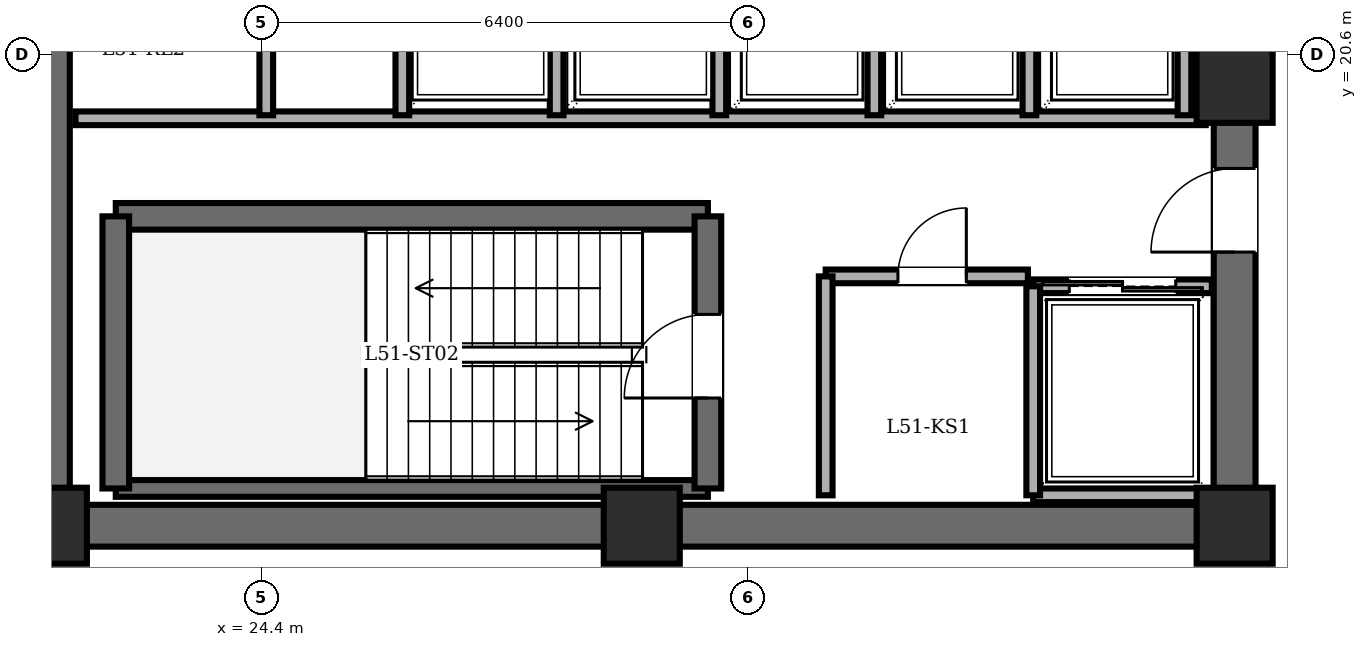
"""IFC4 building model, lengths in metres.
Left out: names, types, materials, properties, quantities, classifications, styles, units other than length and angle.
Written with IfcOpenShell. Run it as: python <this file> out.ifc"""

import sys

from ifc_helpers import new_model, si_unit, direction, frame, frame_2d, origin, origin_2d, place, context, subcontext, project, spatial, rectangle, extrude, element, fill, save


model = new_model("IFC4")
c1 = context("Model", 3, precision=1e-05, world=origin(), true_north=direction((0.0, 1.0)))
c2 = subcontext(c1, "Body", "Model", "MODEL_VIEW")
j1 = project(units=[si_unit("LENGTHUNIT", "METRE"), si_unit("PLANEANGLEUNIT", "RADIAN")], contexts=[c1])
p1 = place(None, origin())
s1 = spatial("IfcSite", under=j1, at=p1, CompositionType="ELEMENT")
p2 = place(p1, origin())
s2 = spatial("IfcBuilding", under=s1, at=p2, CompositionType="ELEMENT")
p3 = place(p2, frame((0.0, 0.0, 196.2)))
s3 = spatial("IfcBuildingStorey", under=s2, at=p3, CompositionType="ELEMENT", Elevation=196.2)
for number, where, z_axis, x_axis in (
    (1, (21.6, 14.4, 0.0), (0.0, 0.0, 1.0), (1.0, 0.0, 0.0)),
    (2, (29.4, 14.4, 0.0), (0.0, 0.0, 1.0), (1.0, 0.0, 0.0)),
    (3, (37.2, 14.4, 0.0), (0.0, 0.0, 1.0), (1.0, 0.0, 0.0)),
    (4, (37.2, 20.2, 0.0), (0.0, 0.0, 1.0), (1.0, 0.0, 0.0)),
):
    element("IfcColumn", number, at=place(p3, frame(where, z_axis=z_axis, x_axis=x_axis)), inside=s3, PredefinedType="COLUMN", context=c2, shape_type="SweptSolid", body=[
        extrude(rectangle(XDim=1.0, YDim=1.0, at=origin_2d()), origin(), (0.0, 0.0, 1.0), 5.1),
    ])
p4 = place(p3, frame((21.6, 14.4, 0.0), z_axis=(0.0, 0.0, 1.0), x_axis=(0.0, 1.0, 0.0)))
e5 = element("IfcWall", 5, at=p4, inside=s3, PredefinedType="SHEAR", context=c2, shape_type="SweptSolid", body=[
    extrude(rectangle(XDim=19.2, YDim=0.55, at=frame_2d((9.6, 0.0))), origin(), (0.0, 0.0, 1.0), 4.9),
])
p5 = place(p3, frame((37.2, 14.4, 0.0), z_axis=(0.0, 0.0, 1.0), x_axis=(-1.0, 0.0, 0.0)))
e6 = element("IfcWall", 6, at=p5, inside=s3, PredefinedType="SHEAR", context=c2, shape_type="SweptSolid", body=[
    extrude(rectangle(XDim=15.6, YDim=0.55, at=frame_2d((7.8, 0.0))), origin(), (0.0, 0.0, 1.0), 4.9),
])
p6 = place(p3, frame((37.2, 14.4, 0.0), z_axis=(0.0, 0.0, 1.0), x_axis=(0.0, 1.0, 0.0)))
e7 = element("IfcWall", 7, at=p6, inside=s3, PredefinedType="SHEAR", context=c2, shape_type="SweptSolid", body=[
    extrude(rectangle(XDim=19.2, YDim=0.55, at=frame_2d((9.6, 0.0))), origin(), (0.0, 0.0, 1.0), 4.9),
])
p7 = place(p6, frame((15.8, 0.0, 0.0)))
e8 = element("IfcOpeningElement", 8, at=p7, cuts=e7, PredefinedType="OPENING", context=c2, shape_type="SweptSolid", body=[
    extrude(rectangle(XDim=1.15, YDim=2.15, at=frame_2d((0.575, 1.075))), frame((0.0, 0.285, 0.0), z_axis=(0.0, -1.0, 0.0), x_axis=(1.0, 0.0, 0.0)), (0.0, 0.0, 1.0), 0.57),
])
p8 = place(p6, frame((3.6, 0.0, 0.0)))
e9 = element("IfcOpeningElement", 9, at=p8, cuts=e7, PredefinedType="OPENING", context=c2, shape_type="SweptSolid", body=[
    extrude(rectangle(XDim=1.1, YDim=2.15, at=frame_2d((0.55, 1.075))), frame((0.0, 0.285, 0.0), z_axis=(0.0, -1.0, 0.0), x_axis=(1.0, 0.0, 0.0)), (0.0, 0.0, 1.0), 0.57),
])
p9 = place(p6, frame((8.6, 0.0, 0.0)))
e10 = element("IfcOpeningElement", 10, at=p9, cuts=e7, PredefinedType="OPENING", context=c2, shape_type="SweptSolid", body=[
    extrude(rectangle(XDim=1.3, YDim=2.2, at=frame_2d((0.65, 1.1))), frame((0.0, 0.285, 0.0), z_axis=(0.0, -1.0, 0.0), x_axis=(1.0, 0.0, 0.0)), (0.0, 0.0, 1.0), 0.57),
])
p10 = place(p3, frame((22.48, 18.47, 0.0), z_axis=(0.0, 0.0, 1.0), x_axis=(1.0, 0.0, 0.0)))
e11 = element("IfcWall", 11, at=p10, inside=s3, PredefinedType="SOLIDWALL", context=c2, shape_type="SweptSolid", body=[
    extrude(rectangle(XDim=7.79, YDim=0.35, at=frame_2d((3.895, 0.0))), origin(), (0.0, 0.0, 1.0), 4.9),
])
p11 = place(p3, frame((22.48, 14.89, 0.0), z_axis=(0.0, 0.0, 1.0), x_axis=(1.0, 0.0, 0.0)))
e12 = element("IfcWall", 12, at=p11, inside=s3, PredefinedType="PARTITIONING", context=c2, shape_type="SweptSolid", body=[
    extrude(rectangle(XDim=7.79, YDim=0.22, at=frame_2d((3.895, 0.0))), origin(), (0.0, 0.0, 1.0), 4.9),
])
p12 = place(p3, frame((22.48, 14.89, 0.0), z_axis=(0.0, 0.0, 1.0), x_axis=(0.0, 1.0, 0.0)))
e13 = element("IfcWall", 13, at=p12, inside=s3, PredefinedType="SOLIDWALL", context=c2, shape_type="SweptSolid", body=[
    extrude(rectangle(XDim=3.58, YDim=0.35, at=frame_2d((1.79, 0.0))), origin(), (0.0, 0.0, 1.0), 4.9),
])
p13 = place(p3, frame((30.27, 14.89, 0.0), z_axis=(0.0, 0.0, 1.0), x_axis=(0.0, 1.0, 0.0)))
e14 = element("IfcWall", 14, at=p13, inside=s3, PredefinedType="SOLIDWALL", context=c2, shape_type="SweptSolid", body=[
    extrude(rectangle(XDim=3.58, YDim=0.35, at=frame_2d((1.79, 0.0))), origin(), (0.0, 0.0, 1.0), 4.9),
])
p14 = place(p13, frame((1.19, 0.0, 0.0)))
e15 = element("IfcOpeningElement", 15, at=p14, cuts=e14, PredefinedType="OPENING", context=c2, shape_type="SweptSolid", body=[
    extrude(rectangle(XDim=1.1, YDim=2.15, at=frame_2d((0.55, 1.075))), frame((0.0, 0.185, 0.0), z_axis=(0.0, -1.0, 0.0), x_axis=(1.0, 0.0, 0.0)), (0.0, 0.0, 1.0), 0.37),
])
p15 = place(p3, frame((21.95, 19.76, 0.0), z_axis=(0.0, 0.0, 1.0), x_axis=(1.0, 0.0, 0.0)))
e16 = element("IfcWall", 16, at=p15, inside=s3, PredefinedType="PARTITIONING", context=c2, shape_type="SweptSolid", body=[
    extrude(rectangle(XDim=14.87, YDim=0.18, at=frame_2d((7.435, 0.0))), origin(), (0.0, 0.0, 1.0), 4.9),
])
p16 = place(p3, frame((31.82, 17.68, 0.0), z_axis=(0.0, 0.0, 1.0), x_axis=(1.0, 0.0, 0.0)))
e17 = element("IfcWall", 17, at=p16, inside=s3, PredefinedType="PARTITIONING", context=c2, shape_type="SweptSolid", body=[
    extrude(rectangle(XDim=2.66, YDim=0.18, at=frame_2d((1.33, 0.0))), origin(), (0.0, 0.0, 1.0), 4.9),
])
p17 = place(p16, frame((0.95, 0.0, 0.0)))
e18 = element("IfcOpeningElement", 18, at=p17, cuts=e17, PredefinedType="OPENING", context=c2, shape_type="SweptSolid", body=[
    extrude(rectangle(XDim=0.9, YDim=2.05, at=frame_2d((0.45, 1.025))), frame((0.0, 0.1, 0.0), z_axis=(0.0, -1.0, 0.0), x_axis=(1.0, 0.0, 0.0)), (0.0, 0.0, 1.0), 0.2),
])
p18 = place(p3, frame((31.82, 14.8, 0.0), z_axis=(0.0, 0.0, 1.0), x_axis=(0.0, 1.0, 0.0)))
e19 = element("IfcWall", 19, at=p18, inside=s3, PredefinedType="PARTITIONING", context=c2, shape_type="SweptSolid", body=[
    extrude(rectangle(XDim=2.88, YDim=0.18, at=frame_2d((1.44, 0.0))), origin(), (0.0, 0.0, 1.0), 4.9),
])
p19 = place(p3, frame((34.55, 17.55, 0.0), z_axis=(0.0, 0.0, 1.0), x_axis=(1.0, 0.0, 0.0)))
e20 = element("IfcWall", 20, at=p19, inside=s3, PredefinedType="PARTITIONING", context=c2, shape_type="SweptSolid", body=[
    extrude(rectangle(XDim=2.35, YDim=0.18, at=frame_2d((1.175, 0.0))), origin(), (0.0, 0.0, 1.0), 4.9),
])
p20 = place(p19, frame((0.475, 0.0, 0.0)))
e21 = element("IfcOpeningElement", 21, at=p20, cuts=e20, PredefinedType="OPENING", context=c2, shape_type="SweptSolid", body=[
    extrude(rectangle(XDim=1.4, YDim=2.3, at=frame_2d((0.7, 1.15))), frame((0.0, 0.1, 0.0), z_axis=(0.0, -1.0, 0.0), x_axis=(1.0, 0.0, 0.0)), (0.0, 0.0, 1.0), 0.2),
])
p21 = place(p3, frame((36.9, 14.8, 0.0), z_axis=(0.0, 0.0, 1.0), x_axis=(-1.0, 0.0, 0.0)))
e22 = element("IfcWall", 22, at=p21, inside=s3, PredefinedType="PARTITIONING", context=c2, shape_type="SweptSolid", body=[
    extrude(rectangle(XDim=2.35, YDim=0.18, at=frame_2d((1.175, 0.0))), origin(), (0.0, 0.0, 1.0), 4.9),
])
p22 = place(p3, frame((34.55, 17.55, 0.0), z_axis=(0.0, 0.0, 1.0), x_axis=(0.0, -1.0, 0.0)))
e23 = element("IfcWall", 23, at=p22, inside=s3, PredefinedType="PARTITIONING", context=c2, shape_type="SweptSolid", body=[
    extrude(rectangle(XDim=2.75, YDim=0.18, at=frame_2d((1.375, 0.0))), origin(), (0.0, 0.0, 1.0), 4.9),
])
for number, where, z_axis, x_axis in (
    (24, (28.28, 19.8, 0.0), (0.0, 0.0, 1.0), (0.0, 1.0, 0.0)),
    (25, (30.42, 19.8, 0.0), (0.0, 0.0, 1.0), (0.0, 1.0, 0.0)),
    (26, (32.46, 19.8, 0.0), (0.0, 0.0, 1.0), (0.0, 1.0, 0.0)),
    (27, (34.5, 19.8, 0.0), (0.0, 0.0, 1.0), (0.0, 1.0, 0.0)),
    (28, (36.54, 19.8, 0.0), (0.0, 0.0, 1.0), (0.0, 1.0, 0.0)),
):
    element("IfcWall", number, at=place(p3, frame(where, z_axis=z_axis, x_axis=x_axis)), inside=s3, PredefinedType="PARTITIONING", context=c2, shape_type="SweptSolid", body=[
        extrude(rectangle(XDim=2.5, YDim=0.18, at=frame_2d((1.25, 0.0))), origin(), (0.0, 0.0, 1.0), 4.9),
    ])
p23 = place(p3, frame((24.46, 19.8, 0.0), z_axis=(0.0, 0.0, 1.0), x_axis=(0.0, 1.0, 0.0)))
e29 = element("IfcWall", 29, at=p23, inside=s3, PredefinedType="PARTITIONING", context=c2, shape_type="SweptSolid", body=[
    extrude(rectangle(XDim=3.85, YDim=0.18, at=frame_2d((1.925, 0.0))), origin(), (0.0, 0.0, 1.0), 4.9),
])
p24 = place(p23, frame((1.465, 0.0, 0.0)))
e30 = element("IfcOpeningElement", 30, at=p24, cuts=e29, PredefinedType="OPENING", context=c2, shape_type="SweptSolid", body=[
    extrude(rectangle(XDim=0.92, YDim=2.1, at=frame_2d((0.46, 1.05))), frame((0.0, 0.1, 0.0), z_axis=(0.0, -1.0, 0.0), x_axis=(1.0, 0.0, 0.0)), (0.0, 0.0, 1.0), 0.2),
])
p25 = place(p3, frame((26.25, 19.8, 0.0), z_axis=(0.0, 0.0, 1.0), x_axis=(0.0, 1.0, 0.0)))
e31 = element("IfcWall", 31, at=p25, inside=s3, PredefinedType="PARTITIONING", context=c2, shape_type="SweptSolid", body=[
    extrude(rectangle(XDim=2.55, YDim=0.18, at=frame_2d((1.275, 0.0))), origin(), (0.0, 0.0, 1.0), 4.9),
])
p26 = place(p14, origin())
e32 = element("IfcDoor", 32, at=p26, inside=s3, OperationType="SINGLE_SWING_LEFT", PredefinedType="DOOR", context=c2, shape_type="SweptSolid", body=[
    extrude(rectangle(XDim=1.1, YDim=2.15, at=frame_2d((0.55, 1.075))), frame((0.0, 0.025, 0.0), z_axis=(0.0, -1.0, 0.0), x_axis=(1.0, 0.0, 0.0)), (0.0, 0.0, 1.0), 0.05),
])
fill(e15, e32)
p27 = place(p8, origin())
e33 = element("IfcDoor", 33, at=p27, inside=s3, OperationType="SINGLE_SWING_LEFT", PredefinedType="DOOR", context=c2, shape_type="SweptSolid", body=[
    extrude(rectangle(XDim=1.1, YDim=2.15, at=frame_2d((0.55, 1.075))), frame((0.0, 0.025, 0.0), z_axis=(0.0, -1.0, 0.0), x_axis=(1.0, 0.0, 0.0)), (0.0, 0.0, 1.0), 0.05),
])
fill(e9, e33)
p28 = place(p17, origin())
e34 = element("IfcDoor", 34, at=p28, inside=s3, OperationType="SINGLE_SWING_RIGHT", PredefinedType="DOOR", context=c2, shape_type="SweptSolid", body=[
    extrude(rectangle(XDim=0.9, YDim=2.05, at=frame_2d((0.45, 1.025))), frame((0.0, 0.025, 0.0), z_axis=(0.0, -1.0, 0.0), x_axis=(1.0, 0.0, 0.0)), (0.0, 0.0, 1.0), 0.05),
])
fill(e18, e34)
p29 = place(p20, origin())
e35 = element("IfcDoor", 35, at=p29, inside=s3, OperationType="DOUBLE_DOOR_SLIDING", PredefinedType="DOOR", context=c2, shape_type="SweptSolid", body=[
    extrude(rectangle(XDim=1.4, YDim=2.3, at=frame_2d((0.7, 1.15))), frame((0.0, 0.025, 0.0), z_axis=(0.0, -1.0, 0.0), x_axis=(1.0, 0.0, 0.0)), (0.0, 0.0, 1.0), 0.05),
])
fill(e21, e35)
save(model, sys.argv[1])
